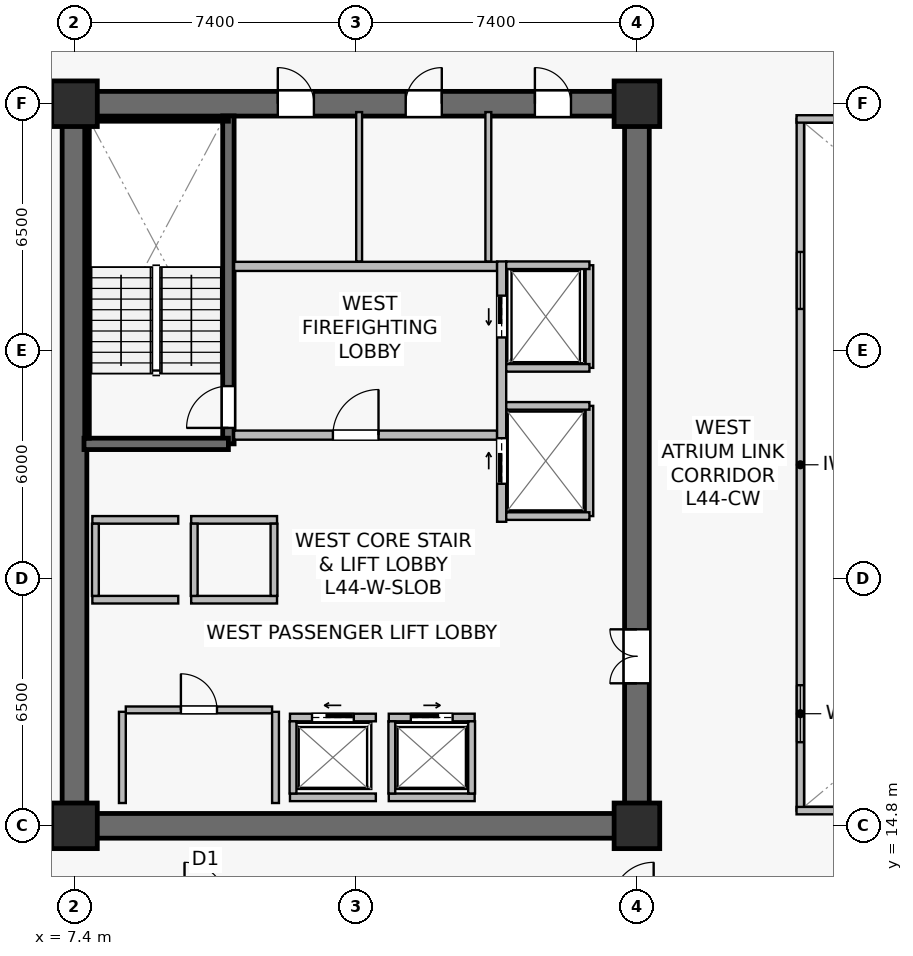
"""IFC4 building model, lengths in metres.
Left out: names, types, materials, properties, quantities, classifications, styles, units other than length and angle.
Written with IfcOpenShell. Run it as: python <this file> out.ifc"""

import sys

from ifc_helpers import new_model, si_unit, direction, frame, frame_2d, origin, origin_2d, place, context, subcontext, project, spatial, rectangle, extrude, source, transform, mapped, element, fill, save


model = new_model("IFC4")
c1 = context("Model", 3, precision=1e-05, world=origin(), true_north=direction((0.0, 1.0)))
c2 = subcontext(c1, "Body", "Model", "MODEL_VIEW")
j1 = project(units=[si_unit("LENGTHUNIT", "METRE"), si_unit("PLANEANGLEUNIT", "RADIAN")], contexts=[c1])
p1 = place(None, origin())
s1 = spatial("IfcSite", under=j1, at=p1, CompositionType="ELEMENT")
p2 = place(p1, origin())
s2 = spatial("IfcBuilding", under=s1, at=p2, CompositionType="ELEMENT")
p3 = place(p2, frame((0.0, 0.0, 183.0)))
s3 = spatial("IfcBuildingStorey", under=s2, at=p3, CompositionType="ELEMENT", Elevation=183.0)
p4 = place(p3, frame((7.075, 14.8, 0.0), z_axis=(0.0, 0.0, 1.0), x_axis=(1.0, 0.0, 0.0)))
e1 = element("IfcWall", 1, at=p4, inside=s3, PredefinedType="SHEAR", context=c2, shape_type="SweptSolid", body=[
    extrude(rectangle(XDim=15.45, YDim=0.65, at=frame_2d((7.725, 0.0))), origin(), (0.0, 0.0, 1.0), 3.79),
])
p5 = place(p3, frame((7.075, 33.8, 0.0), z_axis=(0.0, 0.0, 1.0), x_axis=(1.0, 0.0, 0.0)))
e2 = element("IfcWall", 2, at=p5, inside=s3, PredefinedType="SHEAR", context=c2, shape_type="SweptSolid", body=[
    extrude(rectangle(XDim=15.45, YDim=0.65, at=frame_2d((7.725, 0.0))), origin(), (0.0, 0.0, 1.0), 3.79),
])
p6 = place(p5, frame((5.675, 0.0, 0.0)))
e3 = element("IfcOpeningElement", 3, at=p6, cuts=e2, PredefinedType="OPENING", context=c2, shape_type="SweptSolid", body=[
    extrude(rectangle(XDim=0.95, YDim=2.15, at=frame_2d((0.475, 1.075))), frame((0.0, 0.335, 0.0), z_axis=(0.0, -1.0, 0.0), x_axis=(1.0, 0.0, 0.0)), (0.0, 0.0, 1.0), 0.67),
])
p7 = place(p5, frame((9.04, 0.0, 0.0)))
e4 = element("IfcOpeningElement", 4, at=p7, cuts=e2, PredefinedType="OPENING", context=c2, shape_type="SweptSolid", body=[
    extrude(rectangle(XDim=0.95, YDim=2.15, at=frame_2d((0.475, 1.075))), frame((0.0, 0.335, 0.0), z_axis=(0.0, -1.0, 0.0), x_axis=(1.0, 0.0, 0.0)), (0.0, 0.0, 1.0), 0.67),
])
p8 = place(p5, frame((12.44, 0.0, 0.0)))
e5 = element("IfcOpeningElement", 5, at=p8, cuts=e2, PredefinedType="OPENING", context=c2, shape_type="SweptSolid", body=[
    extrude(rectangle(XDim=0.95, YDim=2.15, at=frame_2d((0.475, 1.075))), frame((0.0, 0.335, 0.0), z_axis=(0.0, -1.0, 0.0), x_axis=(1.0, 0.0, 0.0)), (0.0, 0.0, 1.0), 0.67),
])
p9 = place(p3, frame((7.4, 15.125, 0.0), z_axis=(0.0, 0.0, 1.0), x_axis=(0.0, 1.0, 0.0)))
e6 = element("IfcWall", 6, at=p9, inside=s3, PredefinedType="SHEAR", context=c2, shape_type="SweptSolid", body=[
    extrude(rectangle(XDim=18.35, YDim=0.65, at=frame_2d((9.175, 0.0))), origin(), (0.0, 0.0, 1.0), 3.79),
])
p10 = place(p3, frame((22.2, 15.125, 0.0), z_axis=(0.0, 0.0, 1.0), x_axis=(0.0, 1.0, 0.0)))
e7 = element("IfcWall", 7, at=p10, inside=s3, PredefinedType="SHEAR", context=c2, shape_type="SweptSolid", body=[
    extrude(rectangle(XDim=18.35, YDim=0.65, at=frame_2d((9.175, 0.0))), origin(), (0.0, 0.0, 1.0), 3.79),
])
p11 = place(p10, frame((3.425, 0.0, 0.0)))
e8 = element("IfcOpeningElement", 8, at=p11, cuts=e7, PredefinedType="OPENING", context=c2, shape_type="SweptSolid", body=[
    extrude(rectangle(XDim=1.42, YDim=2.2, at=frame_2d((0.71, 1.1))), frame((0.0, 0.335, 0.0), z_axis=(0.0, -1.0, 0.0), x_axis=(1.0, 0.0, 0.0)), (0.0, 0.0, 1.0), 0.67),
])
p12 = place(p3, frame((11.45, 24.85, 0.0), z_axis=(0.0, 0.0, 1.0), x_axis=(0.0, 1.0, 0.0)))
e9 = element("IfcWall", 9, at=p12, inside=s3, PredefinedType="SHEAR", context=c2, shape_type="SweptSolid", body=[
    extrude(rectangle(XDim=8.63, YDim=0.3, at=frame_2d((4.315, 0.0))), origin(), (0.0, 0.0, 1.0), 3.79),
])
p13 = place(p12, frame((0.42, 0.0, 0.0)))
e10 = element("IfcOpeningElement", 10, at=p13, cuts=e9, PredefinedType="OPENING", context=c2, shape_type="SweptSolid", body=[
    extrude(rectangle(XDim=1.1, YDim=2.15, at=frame_2d((0.55, 1.075))), frame((0.0, 0.16, 0.0), z_axis=(0.0, -1.0, 0.0), x_axis=(1.0, 0.0, 0.0)), (0.0, 0.0, 1.0), 0.32),
])
p14 = place(p3, frame((7.65, 24.85, 0.0), z_axis=(0.0, 0.0, 1.0), x_axis=(1.0, 0.0, 0.0)))
e11 = element("IfcWall", 11, at=p14, inside=s3, PredefinedType="SHEAR", context=c2, shape_type="SweptSolid", body=[
    extrude(rectangle(XDim=3.8, YDim=0.3, at=frame_2d((1.9, 0.0))), origin(), (0.0, 0.0, 1.0), 3.79),
])
p15 = place(p3, frame((7.73, 33.4, 0.0), z_axis=(0.0, 0.0, 1.0), x_axis=(1.0, 0.0, 0.0)))
e12 = element("IfcWall", 12, at=p15, inside=s3, PredefinedType="SOLIDWALL", context=c2, shape_type="SweptSolid", body=[
    extrude(rectangle(XDim=3.72, YDim=0.12, at=frame_2d((1.86, 0.0))), origin(), (0.0, 0.0, 1.0), 3.79),
])
p16 = place(p3, frame((7.73, 25.0, 0.0), z_axis=(0.0, 0.0, 1.0), x_axis=(0.0, 1.0, 0.0)))
e13 = element("IfcWall", 13, at=p16, inside=s3, PredefinedType="SOLIDWALL", context=c2, shape_type="SweptSolid", body=[
    extrude(rectangle(XDim=8.32, YDim=0.12, at=frame_2d((4.16, 0.0))), origin(), (0.0, 0.0, 1.0), 3.79),
])
m1 = source(origin(), c2, "Body", "SweptSolid", [
    extrude(rectangle(XDim=1.2, YDim=1.2, at=origin_2d()), origin(), (0.0, 0.0, 1.0), 4.1),
])
for number, where, z_axis, x_axis in (
    (14, (7.4, 14.8, 0.0), (0.0, 0.0, 1.0), (1.0, 0.0, 0.0)),
    (15, (22.2, 14.8, 0.0), (0.0, 0.0, 1.0), (1.0, 0.0, 0.0)),
    (16, (7.4, 33.8, 0.0), (0.0, 0.0, 1.0), (1.0, 0.0, 0.0)),
    (17, (22.2, 33.8, 0.0), (0.0, 0.0, 1.0), (1.0, 0.0, 0.0)),
):
    element("IfcColumn", number, at=place(p3, frame(where, z_axis=z_axis, x_axis=x_axis)), inside=s3, PredefinedType="COLUMN", context=c2, shape_type="MappedRepresentation", body=[
        mapped(m1, transform((0.0, 0.0, 0.0), scale=1.0)),
    ])
p17 = place(p3, frame((11.6, 25.08, 0.0), z_axis=(0.0, 0.0, 1.0), x_axis=(1.0, 0.0, 0.0)))
e18 = element("IfcWall", 18, at=p17, inside=s3, PredefinedType="SOLIDWALL", context=c2, shape_type="SweptSolid", body=[
    extrude(rectangle(XDim=6.92, YDim=0.24, at=frame_2d((3.46, 0.0))), origin(), (0.0, 0.0, 1.0), 3.187),
])
p18 = place(p17, frame((2.6, 0.0, 0.0)))
e19 = element("IfcOpeningElement", 19, at=p18, cuts=e18, PredefinedType="OPENING", context=c2, shape_type="SweptSolid", body=[
    extrude(rectangle(XDim=1.2, YDim=2.16, at=frame_2d((0.6, 1.08))), frame((0.0, 0.13, 0.0), z_axis=(0.0, -1.0, 0.0), x_axis=(1.0, 0.0, 0.0)), (0.0, 0.0, 1.0), 0.26),
])
p19 = place(p3, frame((11.6, 29.52, 0.0), z_axis=(0.0, 0.0, 1.0), x_axis=(1.0, 0.0, 0.0)))
e20 = element("IfcWall", 20, at=p19, inside=s3, PredefinedType="SOLIDWALL", context=c2, shape_type="SweptSolid", body=[
    extrude(rectangle(XDim=6.92, YDim=0.24, at=frame_2d((3.46, 0.0))), origin(), (0.0, 0.0, 1.0), 3.187),
])
p20 = place(p3, frame((18.64, 22.8, 0.0), z_axis=(0.0, 0.0, 1.0), x_axis=(0.0, 1.0, 0.0)))
e21 = element("IfcWall", 21, at=p20, inside=s3, PredefinedType="SOLIDWALL", context=c2, shape_type="SweptSolid", body=[
    extrude(rectangle(XDim=6.85, YDim=0.24, at=frame_2d((3.425, 0.0))), origin(), (0.0, 0.0, 1.0), 2.925),
])
p21 = place(p20, frame((4.85, 0.0, 0.0)))
e22 = element("IfcOpeningElement", 22, at=p21, cuts=e21, PredefinedType="OPENING", context=c2, shape_type="SweptSolid", body=[
    extrude(rectangle(XDim=1.1, YDim=2.22, at=frame_2d((0.55, 1.11))), frame((0.0, 0.13, 0.0), z_axis=(0.0, -1.0, 0.0), x_axis=(1.0, 0.0, 0.0)), (0.0, 0.0, 1.0), 0.26),
])
p22 = place(p20, frame((1.0, 0.0, 0.0)))
e23 = element("IfcOpeningElement", 23, at=p22, cuts=e21, PredefinedType="OPENING", context=c2, shape_type="SweptSolid", body=[
    extrude(rectangle(XDim=1.2, YDim=2.22, at=frame_2d((0.6, 1.11))), frame((0.0, 0.13, 0.0), z_axis=(0.0, -1.0, 0.0), x_axis=(1.0, 0.0, 0.0)), (0.0, 0.0, 1.0), 0.26),
])
p23 = place(p3, frame((13.07, 17.65, 0.0), z_axis=(0.0, 0.0, 1.0), x_axis=(1.0, 0.0, 0.0)))
e24 = element("IfcWall", 24, at=p23, inside=s3, PredefinedType="SOLIDWALL", context=c2, shape_type="SweptSolid", body=[
    extrude(rectangle(XDim=2.26, YDim=0.2, at=frame_2d((1.13, 0.0))), origin(), (0.0, 0.0, 1.0), 3.187),
])
p24 = place(p23, frame((0.58, 0.0, 0.0)))
e25 = element("IfcOpeningElement", 25, at=p24, cuts=e24, PredefinedType="OPENING", context=c2, shape_type="SweptSolid", body=[
    extrude(rectangle(XDim=1.1, YDim=2.22, at=frame_2d((0.55, 1.11))), frame((0.0, 0.11, 0.0), z_axis=(0.0, -1.0, 0.0), x_axis=(1.0, 0.0, 0.0)), (0.0, 0.0, 1.0), 0.22),
])
p25 = place(p3, frame((13.07, 15.55, 0.0), z_axis=(0.0, 0.0, 1.0), x_axis=(1.0, 0.0, 0.0)))
e26 = element("IfcWall", 26, at=p25, inside=s3, PredefinedType="SOLIDWALL", context=c2, shape_type="SweptSolid", body=[
    extrude(rectangle(XDim=2.26, YDim=0.2, at=frame_2d((1.13, 0.0))), origin(), (0.0, 0.0, 1.0), 3.187),
])
p26 = place(p3, frame((13.15, 15.65, 0.0), z_axis=(0.0, 0.0, 1.0), x_axis=(0.0, 1.0, 0.0)))
e27 = element("IfcWall", 27, at=p26, inside=s3, PredefinedType="SOLIDWALL", context=c2, shape_type="SweptSolid", body=[
    extrude(rectangle(XDim=1.9, YDim=0.18, at=frame_2d((0.95, 0.0))), origin(), (0.0, 0.0, 1.0), 3.79),
])
p27 = place(p3, frame((15.67, 17.65, 0.0), z_axis=(0.0, 0.0, 1.0), x_axis=(1.0, 0.0, 0.0)))
e28 = element("IfcWall", 28, at=p27, inside=s3, PredefinedType="SOLIDWALL", context=c2, shape_type="SweptSolid", body=[
    extrude(rectangle(XDim=2.26, YDim=0.2, at=frame_2d((1.13, 0.0))), origin(), (0.0, 0.0, 1.0), 3.79),
])
p28 = place(p27, frame((0.58, 0.0, 0.0)))
e29 = element("IfcOpeningElement", 29, at=p28, cuts=e28, PredefinedType="OPENING", context=c2, shape_type="SweptSolid", body=[
    extrude(rectangle(XDim=1.1, YDim=2.22, at=frame_2d((0.55, 1.11))), frame((0.0, 0.11, 0.0), z_axis=(0.0, -1.0, 0.0), x_axis=(1.0, 0.0, 0.0)), (0.0, 0.0, 1.0), 0.22),
])
p29 = place(p3, frame((15.67, 15.55, 0.0), z_axis=(0.0, 0.0, 1.0), x_axis=(1.0, 0.0, 0.0)))
e30 = element("IfcWall", 30, at=p29, inside=s3, PredefinedType="SOLIDWALL", context=c2, shape_type="SweptSolid", body=[
    extrude(rectangle(XDim=2.26, YDim=0.2, at=frame_2d((1.13, 0.0))), origin(), (0.0, 0.0, 1.0), 3.79),
])
for number, where, z_axis, x_axis in (
    (31, (15.75, 15.65, 0.0), (0.0, 0.0, 1.0), (0.0, 1.0, 0.0)),
    (32, (17.85, 15.65, 0.0), (0.0, 0.0, 1.0), (0.0, 1.0, 0.0)),
):
    element("IfcWall", number, at=place(p3, frame(where, z_axis=z_axis, x_axis=x_axis)), inside=s3, PredefinedType="SOLIDWALL", context=c2, shape_type="SweptSolid", body=[
        extrude(rectangle(XDim=1.9, YDim=0.18, at=frame_2d((0.95, 0.0))), origin(), (0.0, 0.0, 1.0), 3.79),
    ])
for number, where, z_axis, x_axis in (
    (33, (7.87, 20.75, 0.0), (0.0, 0.0, 1.0), (1.0, 0.0, 0.0)),
    (34, (7.87, 22.85, 0.0), (0.0, 0.0, 1.0), (1.0, 0.0, 0.0)),
):
    element("IfcWall", number, at=place(p3, frame(where, z_axis=z_axis, x_axis=x_axis)), inside=s3, PredefinedType="SOLIDWALL", context=c2, shape_type="SweptSolid", body=[
        extrude(rectangle(XDim=2.26, YDim=0.2, at=frame_2d((1.13, 0.0))), origin(), (0.0, 0.0, 1.0), 3.79),
    ])
p30 = place(p3, frame((7.95, 20.85, 0.0), z_axis=(0.0, 0.0, 1.0), x_axis=(0.0, 1.0, 0.0)))
e35 = element("IfcWall", 35, at=p30, inside=s3, PredefinedType="SOLIDWALL", context=c2, shape_type="SweptSolid", body=[
    extrude(rectangle(XDim=1.9, YDim=0.18, at=frame_2d((0.95, 0.0))), origin(), (0.0, 0.0, 1.0), 3.79),
])
for number, where, z_axis, x_axis in (
    (36, (10.47, 20.75, 0.0), (0.0, 0.0, 1.0), (1.0, 0.0, 0.0)),
    (37, (10.47, 22.85, 0.0), (0.0, 0.0, 1.0), (1.0, 0.0, 0.0)),
):
    element("IfcWall", number, at=place(p3, frame(where, z_axis=z_axis, x_axis=x_axis)), inside=s3, PredefinedType="SOLIDWALL", context=c2, shape_type="SweptSolid", body=[
        extrude(rectangle(XDim=2.26, YDim=0.2, at=frame_2d((1.13, 0.0))), origin(), (0.0, 0.0, 1.0), 3.79),
    ])
for number, where, z_axis, x_axis in (
    (38, (10.55, 20.85, 0.0), (0.0, 0.0, 1.0), (0.0, 1.0, 0.0)),
    (39, (12.65, 20.85, 0.0), (0.0, 0.0, 1.0), (0.0, 1.0, 0.0)),
):
    element("IfcWall", number, at=place(p3, frame(where, z_axis=z_axis, x_axis=x_axis)), inside=s3, PredefinedType="SOLIDWALL", context=c2, shape_type="SweptSolid", body=[
        extrude(rectangle(XDim=1.9, YDim=0.18, at=frame_2d((0.95, 0.0))), origin(), (0.0, 0.0, 1.0), 3.79),
    ])
p31 = place(p3, frame((20.95, 26.85, 0.0), z_axis=(0.0, 0.0, 1.0), x_axis=(0.0, 1.0, 0.0)))
e40 = element("IfcWall", 40, at=p31, inside=s3, PredefinedType="SOLIDWALL", context=c2, shape_type="SweptSolid", body=[
    extrude(rectangle(XDim=2.7, YDim=0.2, at=frame_2d((1.35, 0.0))), origin(), (0.0, 0.0, 1.0), 3.79),
])
p32 = place(p3, frame((18.76, 29.55, 0.0), z_axis=(0.0, 0.0, 1.0), x_axis=(1.0, 0.0, 0.0)))
e41 = element("IfcWall", 41, at=p32, inside=s3, PredefinedType="SOLIDWALL", context=c2, shape_type="SweptSolid", body=[
    extrude(rectangle(XDim=2.19, YDim=0.2, at=frame_2d((1.095, 0.0))), origin(), (0.0, 0.0, 1.0), 3.79),
])
p33 = place(p3, frame((18.76, 26.85, 0.0), z_axis=(0.0, 0.0, 1.0), x_axis=(1.0, 0.0, 0.0)))
e42 = element("IfcWall", 42, at=p33, inside=s3, PredefinedType="SOLIDWALL", context=c2, shape_type="SweptSolid", body=[
    extrude(rectangle(XDim=2.19, YDim=0.2, at=frame_2d((1.095, 0.0))), origin(), (0.0, 0.0, 1.0), 3.187),
])
p34 = place(p3, frame((20.95, 22.95, 0.0), z_axis=(0.0, 0.0, 1.0), x_axis=(0.0, 1.0, 0.0)))
e43 = element("IfcWall", 43, at=p34, inside=s3, PredefinedType="SOLIDWALL", context=c2, shape_type="SweptSolid", body=[
    extrude(rectangle(XDim=2.9, YDim=0.2, at=frame_2d((1.45, 0.0))), origin(), (0.0, 0.0, 1.0), 2.925),
])
for number, where, z_axis, x_axis in (
    (44, (18.76, 25.85, 0.0), (0.0, 0.0, 1.0), (1.0, 0.0, 0.0)),
    (45, (18.76, 22.95, 0.0), (0.0, 0.0, 1.0), (1.0, 0.0, 0.0)),
):
    element("IfcWall", number, at=place(p3, frame(where, z_axis=z_axis, x_axis=x_axis)), inside=s3, PredefinedType="SOLIDWALL", context=c2, shape_type="SweptSolid", body=[
        extrude(rectangle(XDim=2.19, YDim=0.2, at=frame_2d((1.095, 0.0))), origin(), (0.0, 0.0, 1.0), 3.79),
    ])
p35 = place(p3, frame((8.75, 17.85, 0.0), z_axis=(0.0, 0.0, 1.0), x_axis=(1.0, 0.0, 0.0)))
e46 = element("IfcWall", 46, at=p35, inside=s3, PredefinedType="SOLIDWALL", context=c2, shape_type="SweptSolid", body=[
    extrude(rectangle(XDim=3.85, YDim=0.18, at=frame_2d((1.925, 0.0))), origin(), (0.0, 0.0, 1.0), 3.79),
])
p36 = place(p35, frame((1.45, 0.0, 0.0)))
e47 = element("IfcOpeningElement", 47, at=p36, cuts=e46, PredefinedType="OPENING", context=c2, shape_type="SweptSolid", body=[
    extrude(rectangle(XDim=0.95, YDim=2.15, at=frame_2d((0.475, 1.075))), frame((0.0, 0.1, 0.0), z_axis=(0.0, -1.0, 0.0), x_axis=(1.0, 0.0, 0.0)), (0.0, 0.0, 1.0), 0.2),
])
for number, where, z_axis, x_axis in (
    (48, (12.69, 15.4, 0.0), (0.0, 0.0, 1.0), (0.0, 1.0, 0.0)),
    (49, (8.66, 15.4, 0.0), (0.0, 0.0, 1.0), (0.0, 1.0, 0.0)),
):
    element("IfcWall", number, at=place(p3, frame(where, z_axis=z_axis, x_axis=x_axis)), inside=s3, PredefinedType="SOLIDWALL", context=c2, shape_type="SweptSolid", body=[
        extrude(rectangle(XDim=2.4, YDim=0.18, at=frame_2d((1.2, 0.0))), origin(), (0.0, 0.0, 1.0), 3.79),
    ])
p37 = place(p3, frame((14.89, 29.65, 0.0), z_axis=(0.0, 0.0, 1.0), x_axis=(0.0, 1.0, 0.0)))
e50 = element("IfcWall", 50, at=p37, inside=s3, PredefinedType="PLUMBINGWALL", context=c2, shape_type="SweptSolid", body=[
    extrude(rectangle(XDim=3.93, YDim=0.155, at=frame_2d((1.965, 0.0))), origin(), (0.0, 0.0, 1.0), 3.187),
])
p38 = place(p3, frame((18.29, 29.65, 0.0), z_axis=(0.0, 0.0, 1.0), x_axis=(0.0, 1.0, 0.0)))
e51 = element("IfcWall", 51, at=p38, inside=s3, PredefinedType="PLUMBINGWALL", context=c2, shape_type="SweptSolid", body=[
    extrude(rectangle(XDim=3.93, YDim=0.155, at=frame_2d((1.965, 0.0))), origin(), (0.0, 0.0, 1.0), 3.79),
])
p39 = place(p3, frame((26.5, 15.2, 0.0), z_axis=(0.0, 0.0, 1.0), x_axis=(0.0, 1.0, 0.0)))
e52 = element("IfcWall", 52, at=p39, inside=s3, PredefinedType="SOLIDWALL", context=c2, shape_type="SweptSolid", body=[
    extrude(rectangle(XDim=18.2, YDim=0.195, at=frame_2d((9.1, 0.0))), origin(), (0.0, 0.0, 1.0), 3.79),
])
p40 = place(p39, frame((1.8, 0.0, 0.9)))
e53 = element("IfcOpeningElement", 53, at=p40, cuts=e52, PredefinedType="OPENING", context=c2, shape_type="SweptSolid", body=[
    extrude(rectangle(XDim=1.5, YDim=1.4, at=frame_2d((0.75, 0.7))), frame((0.0, 0.107, 0.0), z_axis=(0.0, -1.0, 0.0), x_axis=(1.0, 0.0, 0.0)), (0.0, 0.0, 1.0), 0.215),
])
p41 = place(p39, frame((13.2, 0.0, 0.9)))
e54 = element("IfcOpeningElement", 54, at=p41, cuts=e52, PredefinedType="OPENING", context=c2, shape_type="SweptSolid", body=[
    extrude(rectangle(XDim=1.5, YDim=1.4, at=frame_2d((0.75, 0.7))), frame((0.0, 0.107, 0.0), z_axis=(0.0, -1.0, 0.0), x_axis=(1.0, 0.0, 0.0)), (0.0, 0.0, 1.0), 0.215),
])
for number, where, z_axis, x_axis in (
    (55, (26.4, 15.2, 0.0), (0.0, 0.0, 1.0), (1.0, 0.0, 0.0)),
    (56, (26.4, 33.4, 0.0), (0.0, 0.0, 1.0), (1.0, 0.0, 0.0)),
):
    element("IfcWall", number, at=place(p3, frame(where, z_axis=z_axis, x_axis=x_axis)), inside=s3, PredefinedType="SOLIDWALL", context=c2, shape_type="SweptSolid", body=[
        extrude(rectangle(XDim=22.0, YDim=0.195, at=frame_2d((11.0, 0.0))), origin(), (0.0, 0.0, 1.0), 3.79),
    ])
m2 = source(origin(), c2, "Body", "SweptSolid", [
    extrude(rectangle(XDim=1.5, YDim=1.4, at=frame_2d((0.75, 0.7))), frame((0.0, 0.03, 0.0), z_axis=(0.0, -1.0, 0.0), x_axis=(1.0, 0.0, 0.0)), (0.0, 0.0, 1.0), 0.06),
])
p42 = place(p40, origin())
e57 = element("IfcWindow", 57, at=p42, inside=s3, PartitioningType="SINGLE_PANEL", PredefinedType="WINDOW", context=c2, shape_type="MappedRepresentation", body=[
    mapped(m2, transform((0.0, 0.0, 0.0), scale=1.0)),
])
fill(e53, e57)
p43 = place(p41, origin())
e58 = element("IfcWindow", 58, at=p43, inside=s3, PartitioningType="SINGLE_PANEL", PredefinedType="WINDOW", context=c2, shape_type="MappedRepresentation", body=[
    mapped(m2, transform((0.0, 0.0, 0.0), scale=1.0)),
])
fill(e54, e58)
m3 = source(origin(), c2, "Body", "SweptSolid", [
    extrude(rectangle(XDim=1.1, YDim=2.15, at=frame_2d((0.55, 1.075))), frame((0.0, 0.025, 0.0), z_axis=(0.0, -1.0, 0.0), x_axis=(1.0, 0.0, 0.0)), (0.0, 0.0, 1.0), 0.05),
])
p44 = place(p13, origin())
e59 = element("IfcDoor", 59, at=p44, inside=s3, OperationType="SINGLE_SWING_LEFT", PredefinedType="DOOR", context=c2, shape_type="MappedRepresentation", body=[
    mapped(m3, transform((0.0, 0.0, 0.0), scale=1.0)),
])
fill(e10, e59)
m4 = source(origin(), c2, "Body", "SweptSolid", [
    extrude(rectangle(XDim=1.2, YDim=2.16, at=frame_2d((0.6, 1.08))), frame((0.0, 0.025, 0.0), z_axis=(0.0, -1.0, 0.0), x_axis=(1.0, 0.0, 0.0)), (0.0, 0.0, 1.0), 0.05),
])
p45 = place(p18, origin())
e60 = element("IfcDoor", 60, at=p45, inside=s3, OperationType="SINGLE_SWING_RIGHT", PredefinedType="DOOR", context=c2, shape_type="MappedRepresentation", body=[
    mapped(m4, transform((0.0, 0.0, 0.0), scale=1.0)),
])
fill(e19, e60)
m5 = source(origin(), c2, "Body", "SweptSolid", [
    extrude(rectangle(XDim=1.1, YDim=2.22, at=frame_2d((0.55, 1.11))), frame((0.0, 0.025, 0.0), z_axis=(0.0, -1.0, 0.0), x_axis=(1.0, 0.0, 0.0)), (0.0, 0.0, 1.0), 0.05),
])
p46 = place(p24, origin())
e61 = element("IfcDoor", 61, at=p46, inside=s3, OperationType="SLIDING_TO_LEFT", PredefinedType="USERDEFINED", context=c2, shape_type="MappedRepresentation", body=[
    mapped(m5, transform((0.0, 0.0, 0.0), scale=1.0)),
])
fill(e25, e61)
p47 = place(p28, origin())
e62 = element("IfcDoor", 62, at=p47, inside=s3, OperationType="SLIDING_TO_RIGHT", PredefinedType="USERDEFINED", context=c2, shape_type="MappedRepresentation", body=[
    mapped(m5, transform((0.0, 0.0, 0.0), scale=1.0)),
])
fill(e29, e62)
p48 = place(p21, origin())
e63 = element("IfcDoor", 63, at=p48, inside=s3, OperationType="SLIDING_TO_LEFT", PredefinedType="USERDEFINED", context=c2, shape_type="MappedRepresentation", body=[
    mapped(m5, transform((0.0, 0.0, 0.0), scale=1.0)),
])
fill(e22, e63)
m6 = source(origin(), c2, "Body", "SweptSolid", [
    extrude(rectangle(XDim=1.2, YDim=2.22, at=frame_2d((0.6, 1.11))), frame((0.0, 0.025, 0.0), z_axis=(0.0, -1.0, 0.0), x_axis=(1.0, 0.0, 0.0)), (0.0, 0.0, 1.0), 0.05),
])
p49 = place(p22, origin())
e64 = element("IfcDoor", 64, at=p49, inside=s3, OperationType="SLIDING_TO_RIGHT", PredefinedType="USERDEFINED", context=c2, shape_type="MappedRepresentation", body=[
    mapped(m6, transform((0.0, 0.0, 0.0), scale=1.0)),
])
fill(e23, e64)
m7 = source(origin(), c2, "Body", "SweptSolid", [
    extrude(rectangle(XDim=0.95, YDim=2.15, at=frame_2d((0.475, 1.075))), frame((0.0, 0.025, 0.0), z_axis=(0.0, -1.0, 0.0), x_axis=(1.0, 0.0, 0.0)), (0.0, 0.0, 1.0), 0.05),
])
p50 = place(p36, origin())
e65 = element("IfcDoor", 65, at=p50, inside=s3, OperationType="SINGLE_SWING_LEFT", PredefinedType="DOOR", context=c2, shape_type="MappedRepresentation", body=[
    mapped(m7, transform((0.0, 0.0, 0.0), scale=1.0)),
])
fill(e47, e65)
m8 = source(origin(), c2, "Body", "SweptSolid", [
    extrude(rectangle(XDim=1.42, YDim=2.2, at=frame_2d((0.71, 1.1))), frame((0.0, 0.025, 0.0), z_axis=(0.0, -1.0, 0.0), x_axis=(1.0, 0.0, 0.0)), (0.0, 0.0, 1.0), 0.05),
])
p51 = place(p11, origin())
e66 = element("IfcDoor", 66, at=p51, inside=s3, OperationType="DOUBLE_DOOR_SINGLE_SWING", PredefinedType="DOOR", context=c2, shape_type="MappedRepresentation", body=[
    mapped(m8, transform((0.0, 0.0, 0.0), scale=1.0)),
])
fill(e8, e66)
p52 = place(p6, origin())
e67 = element("IfcDoor", 67, at=p52, inside=s3, OperationType="SINGLE_SWING_LEFT", PredefinedType="DOOR", context=c2, shape_type="MappedRepresentation", body=[
    mapped(m7, transform((0.0, 0.0, 0.0), scale=1.0)),
])
fill(e3, e67)
p53 = place(p7, origin())
e68 = element("IfcDoor", 68, at=p53, inside=s3, OperationType="SINGLE_SWING_RIGHT", PredefinedType="DOOR", context=c2, shape_type="MappedRepresentation", body=[
    mapped(m7, transform((0.0, 0.0, 0.0), scale=1.0)),
])
fill(e4, e68)
p54 = place(p8, origin())
e69 = element("IfcDoor", 69, at=p54, inside=s3, OperationType="SINGLE_SWING_LEFT", PredefinedType="DOOR", context=c2, shape_type="MappedRepresentation", body=[
    mapped(m7, transform((0.0, 0.0, 0.0), scale=1.0)),
])
fill(e5, e69)
save(model, sys.argv[1])
